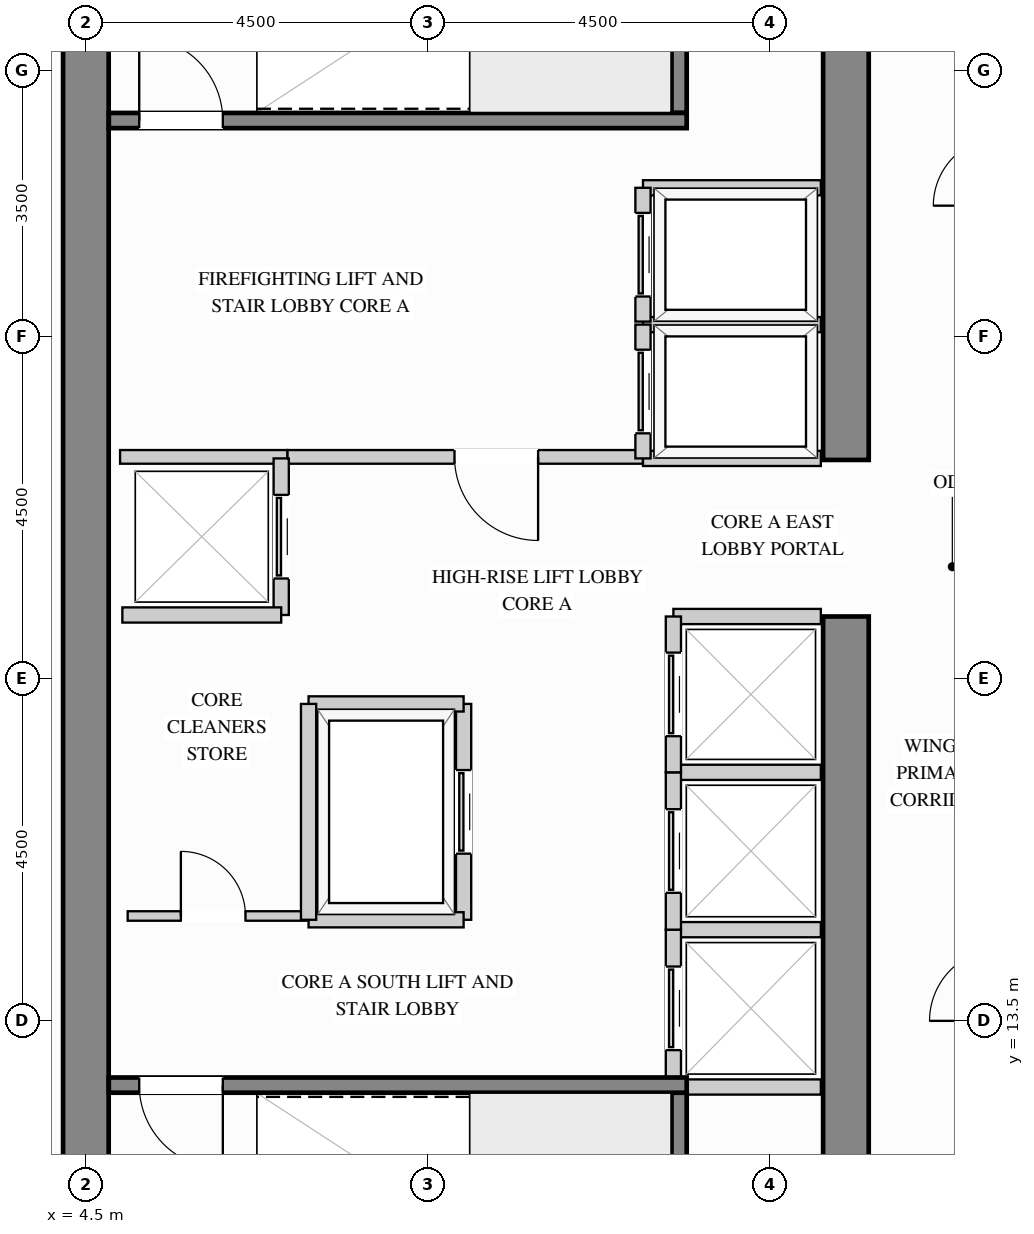
"""IFC4 building model, lengths in metres.
Left out: names, types, materials, properties, quantities, classifications, styles, units other than length and angle.
Written with IfcOpenShell. Run it as: python <this file> out.ifc"""

import sys

from ifc_helpers import new_model, si_unit, direction, frame, frame_2d, origin, place, context, subcontext, project, spatial, rectangle, extrude, source, transform, mapped, element, fill, save


model = new_model("IFC4")
c1 = context("Model", 3, precision=1e-05, world=origin(), true_north=direction((0.0, 1.0)))
c2 = subcontext(c1, "Body", "Model", "MODEL_VIEW")
j1 = project(units=[si_unit("LENGTHUNIT", "METRE"), si_unit("PLANEANGLEUNIT", "RADIAN")], contexts=[c1])
p1 = place(None, origin())
s1 = spatial("IfcSite", under=j1, at=p1, CompositionType="ELEMENT")
p2 = place(p1, origin())
s2 = spatial("IfcBuilding", under=s1, at=p2, CompositionType="ELEMENT")
p3 = place(p2, frame((0.0, 0.0, 189.9)))
s3 = spatial("IfcBuildingStorey", under=s2, at=p3, CompositionType="ELEMENT", Elevation=189.9)
m1 = source(origin(), c2, "Body", "SweptSolid", [
    extrude(rectangle(XDim=10.02, YDim=0.6, at=frame_2d((5.01, 0.0))), origin(), (0.0, 0.0, 1.0), 3.4),
])
p4 = place(p3, frame((14.5, 8.8, 0.0), z_axis=(0.0, 0.0, 1.0), x_axis=(0.0, 1.0, 0.0)))
e1 = element("IfcWall", 1, at=p4, inside=s3, PredefinedType="SHEAR", context=c2, shape_type="MappedRepresentation", body=[
    mapped(m1, transform((0.0, 0.0, 0.0), x_axis=(1.0, 0.0, 0.0), y_axis=(0.0, 1.0, 0.0), z_axis=(0.0, 0.0, 1.0))),
])
m2 = source(origin(), c2, "Body", "SweptSolid", [
    extrude(rectangle(XDim=8.32, YDim=0.6, at=frame_2d((4.16, 0.0))), origin(), (0.0, 0.0, 1.0), 3.4),
])
p5 = place(p3, frame((14.5, 20.88, 0.0), z_axis=(0.0, 0.0, 1.0), x_axis=(0.0, 1.0, 0.0)))
e2 = element("IfcWall", 2, at=p5, inside=s3, PredefinedType="SHEAR", context=c2, shape_type="MappedRepresentation", body=[
    mapped(m2, transform((0.0, 0.0, 0.0), x_axis=(1.0, 0.0, 0.0), y_axis=(0.0, 1.0, 0.0), z_axis=(0.0, 0.0, 1.0))),
])
m3 = source(origin(), c2, "Body", "SweptSolid", [
    extrude(rectangle(XDim=20.4, YDim=0.6, at=frame_2d((10.2, 0.0))), origin(), (0.0, 0.0, 1.0), 3.4),
])
p6 = place(p3, frame((4.5, 8.8, 0.0), z_axis=(0.0, 0.0, 1.0), x_axis=(0.0, 1.0, 0.0)))
e3 = element("IfcWall", 3, at=p6, inside=s3, PredefinedType="SHEAR", context=c2, shape_type="MappedRepresentation", body=[
    mapped(m3, transform((0.0, 0.0, 0.0), x_axis=(1.0, 0.0, 0.0), y_axis=(0.0, 1.0, 0.0), z_axis=(0.0, 0.0, 1.0))),
])
p7 = place(p3, frame((7.15, 20.92, 0.0), z_axis=(0.0, 0.0, 1.0), x_axis=(1.0, 0.0, 0.0)))
e4 = element("IfcWall", 4, at=p7, inside=s3, PredefinedType="PARTITIONING", context=c2, shape_type="SweptSolid", body=[
    extrude(rectangle(XDim=4.68, YDim=0.18, at=frame_2d((2.34, 0.0))), origin(), (0.0, 0.0, 1.0), 3.385),
])
p8 = place(p7, frame((2.2, 0.0, 0.0)))
e5 = element("IfcOpeningElement", 5, at=p8, cuts=e4, PredefinedType="OPENING", context=c2, shape_type="SweptSolid", body=[
    extrude(rectangle(XDim=1.1, YDim=2.15, at=frame_2d((0.55, 1.075))), frame((0.0, 0.1, 0.0), z_axis=(0.0, -1.0, 0.0), x_axis=(1.0, 0.0, 0.0)), (0.0, 0.0, 1.0), 0.2),
])
m4 = source(origin(), c2, "Body", "SweptSolid", [
    extrude(rectangle(XDim=2.2, YDim=0.18, at=frame_2d((1.1, 0.0))), origin(), (0.0, 0.0, 1.0), 3.385),
])
p9 = place(p3, frame((4.95, 20.92, 0.0), z_axis=(0.0, 0.0, 1.0), x_axis=(1.0, 0.0, 0.0)))
e6 = element("IfcWall", 6, at=p9, inside=s3, PredefinedType="PARTITIONING", context=c2, shape_type="MappedRepresentation", body=[
    mapped(m4, transform((0.0, 0.0, 0.0), x_axis=(1.0, 0.0, 0.0), y_axis=(0.0, 1.0, 0.0), z_axis=(0.0, 0.0, 1.0))),
])
p10 = place(p3, frame((5.05, 14.88, 0.0), z_axis=(0.0, 0.0, 1.0), x_axis=(1.0, 0.0, 0.0)))
e7 = element("IfcWall", 7, at=p10, inside=s3, PredefinedType="PARTITIONING", context=c2, shape_type="SweptSolid", body=[
    extrude(rectangle(XDim=2.35, YDim=0.125, at=frame_2d((1.175, 0.0))), origin(), (0.0, 0.0, 1.0), 3.385),
])
p11 = place(p10, frame((0.7, 0.0, 0.0)))
e8 = element("IfcOpeningElement", 8, at=p11, cuts=e7, PredefinedType="OPENING", context=c2, shape_type="SweptSolid", body=[
    extrude(rectangle(XDim=0.85, YDim=2.1, at=frame_2d((0.425, 1.05))), frame((0.0, 0.073, 0.0), z_axis=(0.0, -1.0, 0.0), x_axis=(1.0, 0.0, 0.0)), (0.0, 0.0, 1.0), 0.145),
])
m5 = source(origin(), c2, "Body", "SweptSolid", [
    extrude(rectangle(XDim=2.34, YDim=0.2, at=frame_2d((1.17, 0.0))), origin(), (0.0, 0.0, 1.0), 3.385),
])
for number, where, z_axis, x_axis in (
    (9, (11.83, 22.66, 0.0), (0.0, 0.0, 1.0), (1.0, 0.0, 0.0)),
    (10, (11.83, 20.9, 0.0), (0.0, 0.0, 1.0), (1.0, 0.0, 0.0)),
):
    element("IfcWall", number, at=place(p3, frame(where, z_axis=z_axis, x_axis=x_axis)), inside=s3, PredefinedType="PARTITIONING", context=c2, shape_type="MappedRepresentation", body=[
        mapped(m5, transform((0.0, 0.0, 0.0), x_axis=(1.0, 0.0, 0.0), y_axis=(0.0, 1.0, 0.0), z_axis=(0.0, 0.0, 1.0))),
    ])
p12 = place(p3, frame((11.83, 20.9, 0.0), z_axis=(0.0, 0.0, 1.0), x_axis=(0.0, 1.0, 0.0)))
e11 = element("IfcWall", 11, at=p12, inside=s3, PredefinedType="PARTITIONING", context=c2, shape_type="SweptSolid", body=[
    extrude(rectangle(XDim=1.76, YDim=0.2, at=frame_2d((0.88, 0.0))), origin(), (0.0, 0.0, 1.0), 3.385),
])
p13 = place(p12, frame((0.33, 0.0, 0.0)))
e12 = element("IfcOpeningElement", 12, at=p13, cuts=e11, PredefinedType="OPENING", context=c2, shape_type="SweptSolid", body=[
    extrude(rectangle(XDim=1.1, YDim=2.2, at=frame_2d((0.55, 1.1))), frame((0.0, 0.11, 0.0), z_axis=(0.0, -1.0, 0.0), x_axis=(1.0, 0.0, 0.0)), (0.0, 0.0, 1.0), 0.22),
])
p14 = place(p3, frame((11.83, 24.46, 0.0), z_axis=(0.0, 0.0, 1.0), x_axis=(1.0, 0.0, 0.0)))
e13 = element("IfcWall", 13, at=p14, inside=s3, PredefinedType="PARTITIONING", context=c2, shape_type="MappedRepresentation", body=[
    mapped(m5, transform((0.0, 0.0, 0.0), x_axis=(1.0, 0.0, 0.0), y_axis=(0.0, 1.0, 0.0), z_axis=(0.0, 0.0, 1.0))),
])
p15 = place(p3, frame((11.83, 22.7, 0.0), z_axis=(0.0, 0.0, 1.0), x_axis=(0.0, 1.0, 0.0)))
e14 = element("IfcWall", 14, at=p15, inside=s3, PredefinedType="PARTITIONING", context=c2, shape_type="SweptSolid", body=[
    extrude(rectangle(XDim=1.76, YDim=0.2, at=frame_2d((0.88, 0.0))), origin(), (0.0, 0.0, 1.0), 3.385),
])
p16 = place(p15, frame((0.33, 0.0, 0.0)))
e15 = element("IfcOpeningElement", 15, at=p16, cuts=e14, PredefinedType="OPENING", context=c2, shape_type="SweptSolid", body=[
    extrude(rectangle(XDim=1.1, YDim=2.2, at=frame_2d((0.55, 1.1))), frame((0.0, 0.11, 0.0), z_axis=(0.0, -1.0, 0.0), x_axis=(1.0, 0.0, 0.0)), (0.0, 0.0, 1.0), 0.22),
])
m6 = source(origin(), c2, "Body", "SweptSolid", [
    extrude(rectangle(XDim=1.94, YDim=0.2, at=frame_2d((0.97, 0.0))), origin(), (0.0, 0.0, 1.0), 3.385),
])
for number, where, z_axis, x_axis in (
    (16, (12.23, 14.7, 0.0), (0.0, 0.0, 1.0), (1.0, 0.0, 0.0)),
    (17, (12.23, 12.63, 0.0), (0.0, 0.0, 1.0), (1.0, 0.0, 0.0)),
):
    element("IfcWall", number, at=place(p3, frame(where, z_axis=z_axis, x_axis=x_axis)), inside=s3, PredefinedType="PARTITIONING", context=c2, shape_type="MappedRepresentation", body=[
        mapped(m6, transform((0.0, 0.0, 0.0), x_axis=(1.0, 0.0, 0.0), y_axis=(0.0, 1.0, 0.0), z_axis=(0.0, 0.0, 1.0))),
    ])
p17 = place(p3, frame((12.23, 12.63, 0.0), z_axis=(0.0, 0.0, 1.0), x_axis=(0.0, 1.0, 0.0)))
e18 = element("IfcWall", 18, at=p17, inside=s3, PredefinedType="PARTITIONING", context=c2, shape_type="SweptSolid", body=[
    extrude(rectangle(XDim=2.07, YDim=0.2, at=frame_2d((1.035, 0.0))), origin(), (0.0, 0.0, 1.0), 3.385),
])
p18 = place(p17, frame((0.485, 0.0, 0.0)))
e19 = element("IfcOpeningElement", 19, at=p18, cuts=e18, PredefinedType="OPENING", context=c2, shape_type="SweptSolid", body=[
    extrude(rectangle(XDim=1.1, YDim=2.2, at=frame_2d((0.55, 1.1))), frame((0.0, 0.11, 0.0), z_axis=(0.0, -1.0, 0.0), x_axis=(1.0, 0.0, 0.0)), (0.0, 0.0, 1.0), 0.22),
])
p19 = place(p3, frame((12.23, 16.77, 0.0), z_axis=(0.0, 0.0, 1.0), x_axis=(1.0, 0.0, 0.0)))
e20 = element("IfcWall", 20, at=p19, inside=s3, PredefinedType="PARTITIONING", context=c2, shape_type="MappedRepresentation", body=[
    mapped(m6, transform((0.0, 0.0, 0.0), x_axis=(1.0, 0.0, 0.0), y_axis=(0.0, 1.0, 0.0), z_axis=(0.0, 0.0, 1.0))),
])
p20 = place(p3, frame((12.23, 14.7, 0.0), z_axis=(0.0, 0.0, 1.0), x_axis=(0.0, 1.0, 0.0)))
e21 = element("IfcWall", 21, at=p20, inside=s3, PredefinedType="PARTITIONING", context=c2, shape_type="SweptSolid", body=[
    extrude(rectangle(XDim=2.07, YDim=0.2, at=frame_2d((1.035, 0.0))), origin(), (0.0, 0.0, 1.0), 3.385),
])
p21 = place(p20, frame((0.485, 0.0, 0.0)))
e22 = element("IfcOpeningElement", 22, at=p21, cuts=e21, PredefinedType="OPENING", context=c2, shape_type="SweptSolid", body=[
    extrude(rectangle(XDim=1.1, YDim=2.2, at=frame_2d((0.55, 1.1))), frame((0.0, 0.11, 0.0), z_axis=(0.0, -1.0, 0.0), x_axis=(1.0, 0.0, 0.0)), (0.0, 0.0, 1.0), 0.22),
])
p22 = place(p3, frame((12.23, 18.82, 0.0), z_axis=(0.0, 0.0, 1.0), x_axis=(1.0, 0.0, 0.0)))
e23 = element("IfcWall", 23, at=p22, inside=s3, PredefinedType="PARTITIONING", context=c2, shape_type="MappedRepresentation", body=[
    mapped(m6, transform((0.0, 0.0, 0.0), x_axis=(1.0, 0.0, 0.0), y_axis=(0.0, 1.0, 0.0), z_axis=(0.0, 0.0, 1.0))),
])
p23 = place(p3, frame((12.23, 16.77, 0.0), z_axis=(0.0, 0.0, 1.0), x_axis=(0.0, 1.0, 0.0)))
e24 = element("IfcWall", 24, at=p23, inside=s3, PredefinedType="PARTITIONING", context=c2, shape_type="SweptSolid", body=[
    extrude(rectangle(XDim=2.05, YDim=0.2, at=frame_2d((1.025, 0.0))), origin(), (0.0, 0.0, 1.0), 3.385),
])
p24 = place(p23, frame((0.475, 0.0, 0.0)))
e25 = element("IfcOpeningElement", 25, at=p24, cuts=e24, PredefinedType="OPENING", context=c2, shape_type="SweptSolid", body=[
    extrude(rectangle(XDim=1.1, YDim=2.2, at=frame_2d((0.55, 1.1))), frame((0.0, 0.11, 0.0), z_axis=(0.0, -1.0, 0.0), x_axis=(1.0, 0.0, 0.0)), (0.0, 0.0, 1.0), 0.22),
])
p25 = place(p3, frame((7.07, 18.84, 0.0), z_axis=(0.0, 0.0, 1.0), x_axis=(0.0, 1.0, 0.0)))
e26 = element("IfcWall", 26, at=p25, inside=s3, PredefinedType="PARTITIONING", context=c2, shape_type="SweptSolid", body=[
    extrude(rectangle(XDim=2.06, YDim=0.2, at=frame_2d((1.03, 0.0))), origin(), (0.0, 0.0, 1.0), 3.385),
])
p26 = place(p25, frame((0.48, 0.0, 0.0)))
e27 = element("IfcOpeningElement", 27, at=p26, cuts=e26, PredefinedType="OPENING", context=c2, shape_type="SweptSolid", body=[
    extrude(rectangle(XDim=1.1, YDim=2.2, at=frame_2d((0.55, 1.1))), frame((0.0, 0.11, 0.0), z_axis=(0.0, -1.0, 0.0), x_axis=(1.0, 0.0, 0.0)), (0.0, 0.0, 1.0), 0.22),
])
m7 = source(origin(), c2, "Body", "SweptSolid", [
    extrude(rectangle(XDim=2.09, YDim=0.2, at=frame_2d((1.045, 0.0))), origin(), (0.0, 0.0, 1.0), 3.385),
])
p27 = place(p3, frame((4.98, 18.84, 0.0), z_axis=(0.0, 0.0, 1.0), x_axis=(1.0, 0.0, 0.0)))
e28 = element("IfcWall", 28, at=p27, inside=s3, PredefinedType="PARTITIONING", context=c2, shape_type="MappedRepresentation", body=[
    mapped(m7, transform((0.0, 0.0, 0.0), x_axis=(1.0, 0.0, 0.0), y_axis=(0.0, 1.0, 0.0), z_axis=(0.0, 0.0, 1.0))),
])
p28 = place(p3, frame((9.47, 14.83, 0.0), z_axis=(0.0, 0.0, 1.0), x_axis=(0.0, 1.0, 0.0)))
e29 = element("IfcWall", 29, at=p28, inside=s3, PredefinedType="PARTITIONING", context=c2, shape_type="SweptSolid", body=[
    extrude(rectangle(XDim=2.84, YDim=0.2, at=frame_2d((1.42, 0.0))), origin(), (0.0, 0.0, 1.0), 3.385),
])
p29 = place(p28, frame((0.87, 0.0, 0.0)))
e30 = element("IfcOpeningElement", 30, at=p29, cuts=e29, PredefinedType="OPENING", context=c2, shape_type="SweptSolid", body=[
    extrude(rectangle(XDim=1.1, YDim=2.2, at=frame_2d((0.55, 1.1))), frame((0.0, 0.11, 0.0), z_axis=(0.0, -1.0, 0.0), x_axis=(1.0, 0.0, 0.0)), (0.0, 0.0, 1.0), 0.22),
])
m8 = source(origin(), c2, "Body", "SweptSolid", [
    extrude(rectangle(XDim=2.04, YDim=0.2, at=frame_2d((1.02, 0.0))), origin(), (0.0, 0.0, 1.0), 3.385),
])
for number, where, z_axis, x_axis in (
    (31, (7.43, 17.67, 0.0), (0.0, 0.0, 1.0), (1.0, 0.0, 0.0)),
    (32, (7.43, 14.83, 0.0), (0.0, 0.0, 1.0), (1.0, 0.0, 0.0)),
):
    element("IfcWall", number, at=place(p3, frame(where, z_axis=z_axis, x_axis=x_axis)), inside=s3, PredefinedType="PARTITIONING", context=c2, shape_type="MappedRepresentation", body=[
        mapped(m8, transform((0.0, 0.0, 0.0), x_axis=(1.0, 0.0, 0.0), y_axis=(0.0, 1.0, 0.0), z_axis=(0.0, 0.0, 1.0))),
    ])
m9 = source(origin(), c2, "Body", "SweptSolid", [
    extrude(rectangle(XDim=2.84, YDim=0.2, at=frame_2d((1.42, 0.0))), origin(), (0.0, 0.0, 1.0), 3.385),
])
p30 = place(p3, frame((7.43, 14.83, 0.0), z_axis=(0.0, 0.0, 1.0), x_axis=(0.0, 1.0, 0.0)))
e33 = element("IfcWall", 33, at=p30, inside=s3, PredefinedType="PARTITIONING", context=c2, shape_type="MappedRepresentation", body=[
    mapped(m9, transform((0.0, 0.0, 0.0), x_axis=(1.0, 0.0, 0.0), y_axis=(0.0, 1.0, 0.0), z_axis=(0.0, 0.0, 1.0))),
])
m10 = source(origin(), c2, "Body", "SweptSolid", [
    extrude(rectangle(XDim=3.753, YDim=0.2, at=frame_2d((1.876, 0.0))), origin(), (0.0, 0.0, 1.0), 3.4),
])
p31 = place(p3, frame((12.305, 8.802, 0.0), z_axis=(0.0, 0.0, 1.0), x_axis=(0.0, 1.0, 0.0)))
e34 = element("IfcWall", 34, at=p31, inside=s3, PredefinedType="SHEAR", context=c2, shape_type="MappedRepresentation", body=[
    mapped(m10, transform((0.0, 0.0, 0.0), x_axis=(1.0, 0.0, 0.0), y_axis=(0.0, 1.0, 0.0), z_axis=(0.0, 0.0, 1.0))),
])
p32 = place(p3, frame((4.802, 12.655, 0.0), z_axis=(0.0, 0.0, 1.0), x_axis=(1.0, 0.0, 0.0)))
e35 = element("IfcWall", 35, at=p32, inside=s3, PredefinedType="SHEAR", context=c2, shape_type="SweptSolid", body=[
    extrude(rectangle(XDim=7.603, YDim=0.2, at=frame_2d((3.802, 0.0))), origin(), (0.0, 0.0, 1.0), 3.4),
])
p33 = place(p32, frame((0.4, 0.0, 0.0)))
e36 = element("IfcOpeningElement", 36, at=p33, cuts=e35, PredefinedType="OPENING", context=c2, shape_type="SweptSolid", body=[
    extrude(rectangle(XDim=1.1, YDim=2.15, at=frame_2d((0.55, 1.075))), frame((0.0, 0.11, 0.0), z_axis=(0.0, -1.0, 0.0), x_axis=(1.0, 0.0, 0.0)), (0.0, 0.0, 1.0), 0.22),
])
p34 = place(p3, frame((12.305, 25.445, 0.0), z_axis=(0.0, 0.0, 1.0), x_axis=(0.0, 1.0, 0.0)))
e37 = element("IfcWall", 37, at=p34, inside=s3, PredefinedType="SHEAR", context=c2, shape_type="MappedRepresentation", body=[
    mapped(m10, transform((0.0, 0.0, 0.0), x_axis=(1.0, 0.0, 0.0), y_axis=(0.0, 1.0, 0.0), z_axis=(0.0, 0.0, 1.0))),
])
p35 = place(p3, frame((4.802, 25.345, 0.0), z_axis=(0.0, 0.0, 1.0), x_axis=(1.0, 0.0, 0.0)))
e38 = element("IfcWall", 38, at=p35, inside=s3, PredefinedType="SHEAR", context=c2, shape_type="SweptSolid", body=[
    extrude(rectangle(XDim=7.603, YDim=0.2, at=frame_2d((3.802, 0.0))), origin(), (0.0, 0.0, 1.0), 3.4),
])
p36 = place(p35, frame((0.4, 0.0, 0.0)))
e39 = element("IfcOpeningElement", 39, at=p36, cuts=e38, PredefinedType="OPENING", context=c2, shape_type="SweptSolid", body=[
    extrude(rectangle(XDim=1.1, YDim=2.15, at=frame_2d((0.55, 1.075))), frame((0.0, 0.11, 0.0), z_axis=(0.0, -1.0, 0.0), x_axis=(1.0, 0.0, 0.0)), (0.0, 0.0, 1.0), 0.22),
])
m11 = source(origin(), c2, "Body", "SweptSolid", [
    extrude(rectangle(XDim=1.1, YDim=2.15, at=frame_2d((0.55, 1.075))), frame((0.0, 0.025, 0.0), z_axis=(0.0, -1.0, 0.0), x_axis=(1.0, 0.0, 0.0)), (0.0, 0.0, 1.0), 0.05),
])
p37 = place(p8, origin())
e40 = element("IfcDoor", 40, at=p37, inside=s3, OperationType="SINGLE_SWING_RIGHT", PredefinedType="DOOR", context=c2, shape_type="MappedRepresentation", body=[
    mapped(m11, transform((0.0, 0.0, 0.0), x_axis=(1.0, 0.0, 0.0), y_axis=(0.0, 1.0, 0.0), z_axis=(0.0, 0.0, 1.0))),
])
fill(e5, e40)
m12 = source(origin(), c2, "Body", "SweptSolid", [
    extrude(rectangle(XDim=1.1, YDim=2.2, at=frame_2d((0.55, 1.1))), frame((0.0, 0.025, 0.0), z_axis=(0.0, -1.0, 0.0), x_axis=(1.0, 0.0, 0.0)), (0.0, 0.0, 1.0), 0.05),
])
p38 = place(p13, origin())
e41 = element("IfcDoor", 41, at=p38, inside=s3, OperationType="SLIDING_TO_LEFT", PredefinedType="DOOR", context=c2, shape_type="MappedRepresentation", body=[
    mapped(m12, transform((0.0, 0.0, 0.0), x_axis=(1.0, 0.0, 0.0), y_axis=(0.0, 1.0, 0.0), z_axis=(0.0, 0.0, 1.0))),
])
fill(e12, e41)
p39 = place(p16, origin())
e42 = element("IfcDoor", 42, at=p39, inside=s3, OperationType="SLIDING_TO_LEFT", PredefinedType="DOOR", context=c2, shape_type="MappedRepresentation", body=[
    mapped(m12, transform((0.0, 0.0, 0.0), x_axis=(1.0, 0.0, 0.0), y_axis=(0.0, 1.0, 0.0), z_axis=(0.0, 0.0, 1.0))),
])
fill(e15, e42)
p40 = place(p18, origin())
e43 = element("IfcDoor", 43, at=p40, inside=s3, OperationType="SLIDING_TO_LEFT", PredefinedType="DOOR", context=c2, shape_type="MappedRepresentation", body=[
    mapped(m12, transform((0.0, 0.0, 0.0), x_axis=(1.0, 0.0, 0.0), y_axis=(0.0, 1.0, 0.0), z_axis=(0.0, 0.0, 1.0))),
])
fill(e19, e43)
p41 = place(p21, origin())
e44 = element("IfcDoor", 44, at=p41, inside=s3, OperationType="SLIDING_TO_LEFT", PredefinedType="DOOR", context=c2, shape_type="MappedRepresentation", body=[
    mapped(m12, transform((0.0, 0.0, 0.0), x_axis=(1.0, 0.0, 0.0), y_axis=(0.0, 1.0, 0.0), z_axis=(0.0, 0.0, 1.0))),
])
fill(e22, e44)
p42 = place(p24, origin())
e45 = element("IfcDoor", 45, at=p42, inside=s3, OperationType="SLIDING_TO_LEFT", PredefinedType="DOOR", context=c2, shape_type="MappedRepresentation", body=[
    mapped(m12, transform((0.0, 0.0, 0.0), x_axis=(1.0, 0.0, 0.0), y_axis=(0.0, 1.0, 0.0), z_axis=(0.0, 0.0, 1.0))),
])
fill(e25, e45)
p43 = place(p26, origin())
e46 = element("IfcDoor", 46, at=p43, inside=s3, OperationType="SLIDING_TO_LEFT", PredefinedType="DOOR", context=c2, shape_type="MappedRepresentation", body=[
    mapped(m12, transform((0.0, 0.0, 0.0), x_axis=(1.0, 0.0, 0.0), y_axis=(0.0, 1.0, 0.0), z_axis=(0.0, 0.0, 1.0))),
])
fill(e27, e46)
p44 = place(p29, origin())
e47 = element("IfcDoor", 47, at=p44, inside=s3, OperationType="SLIDING_TO_LEFT", PredefinedType="DOOR", context=c2, shape_type="MappedRepresentation", body=[
    mapped(m12, transform((0.0, 0.0, 0.0), x_axis=(1.0, 0.0, 0.0), y_axis=(0.0, 1.0, 0.0), z_axis=(0.0, 0.0, 1.0))),
])
fill(e30, e47)
m13 = source(origin(), c2, "Body", "SweptSolid", [
    extrude(rectangle(XDim=0.85, YDim=2.1, at=frame_2d((0.425, 1.05))), frame((0.0, 0.025, 0.0), z_axis=(0.0, -1.0, 0.0), x_axis=(1.0, 0.0, 0.0)), (0.0, 0.0, 1.0), 0.05),
])
p45 = place(p11, origin())
e48 = element("IfcDoor", 48, at=p45, inside=s3, OperationType="SINGLE_SWING_LEFT", PredefinedType="DOOR", context=c2, shape_type="MappedRepresentation", body=[
    mapped(m13, transform((0.0, 0.0, 0.0), x_axis=(1.0, 0.0, 0.0), y_axis=(0.0, 1.0, 0.0), z_axis=(0.0, 0.0, 1.0))),
])
fill(e8, e48)
m14 = source(origin(), c2, "Body", "SweptSolid", [
    extrude(rectangle(XDim=1.1, YDim=2.15, at=frame_2d((0.55, 1.075))), frame((0.0, 0.025, 0.0), z_axis=(0.0, -1.0, 0.0), x_axis=(1.0, 0.0, 0.0)), (0.0, 0.0, 1.0), 0.05),
])
p46 = place(p33, origin())
e49 = element("IfcDoor", 49, at=p46, inside=s3, OperationType="SINGLE_SWING_RIGHT", PredefinedType="DOOR", context=c2, shape_type="MappedRepresentation", body=[
    mapped(m14, transform((0.0, 0.0, 0.0), x_axis=(1.0, 0.0, 0.0), y_axis=(0.0, 1.0, 0.0), z_axis=(0.0, 0.0, 1.0))),
])
fill(e36, e49)
p47 = place(p36, origin())
e50 = element("IfcDoor", 50, at=p47, inside=s3, OperationType="SINGLE_SWING_LEFT", PredefinedType="DOOR", context=c2, shape_type="MappedRepresentation", body=[
    mapped(m14, transform((0.0, 0.0, 0.0), x_axis=(1.0, 0.0, 0.0), y_axis=(0.0, 1.0, 0.0), z_axis=(0.0, 0.0, 1.0))),
])
fill(e39, e50)
save(model, sys.argv[1])
